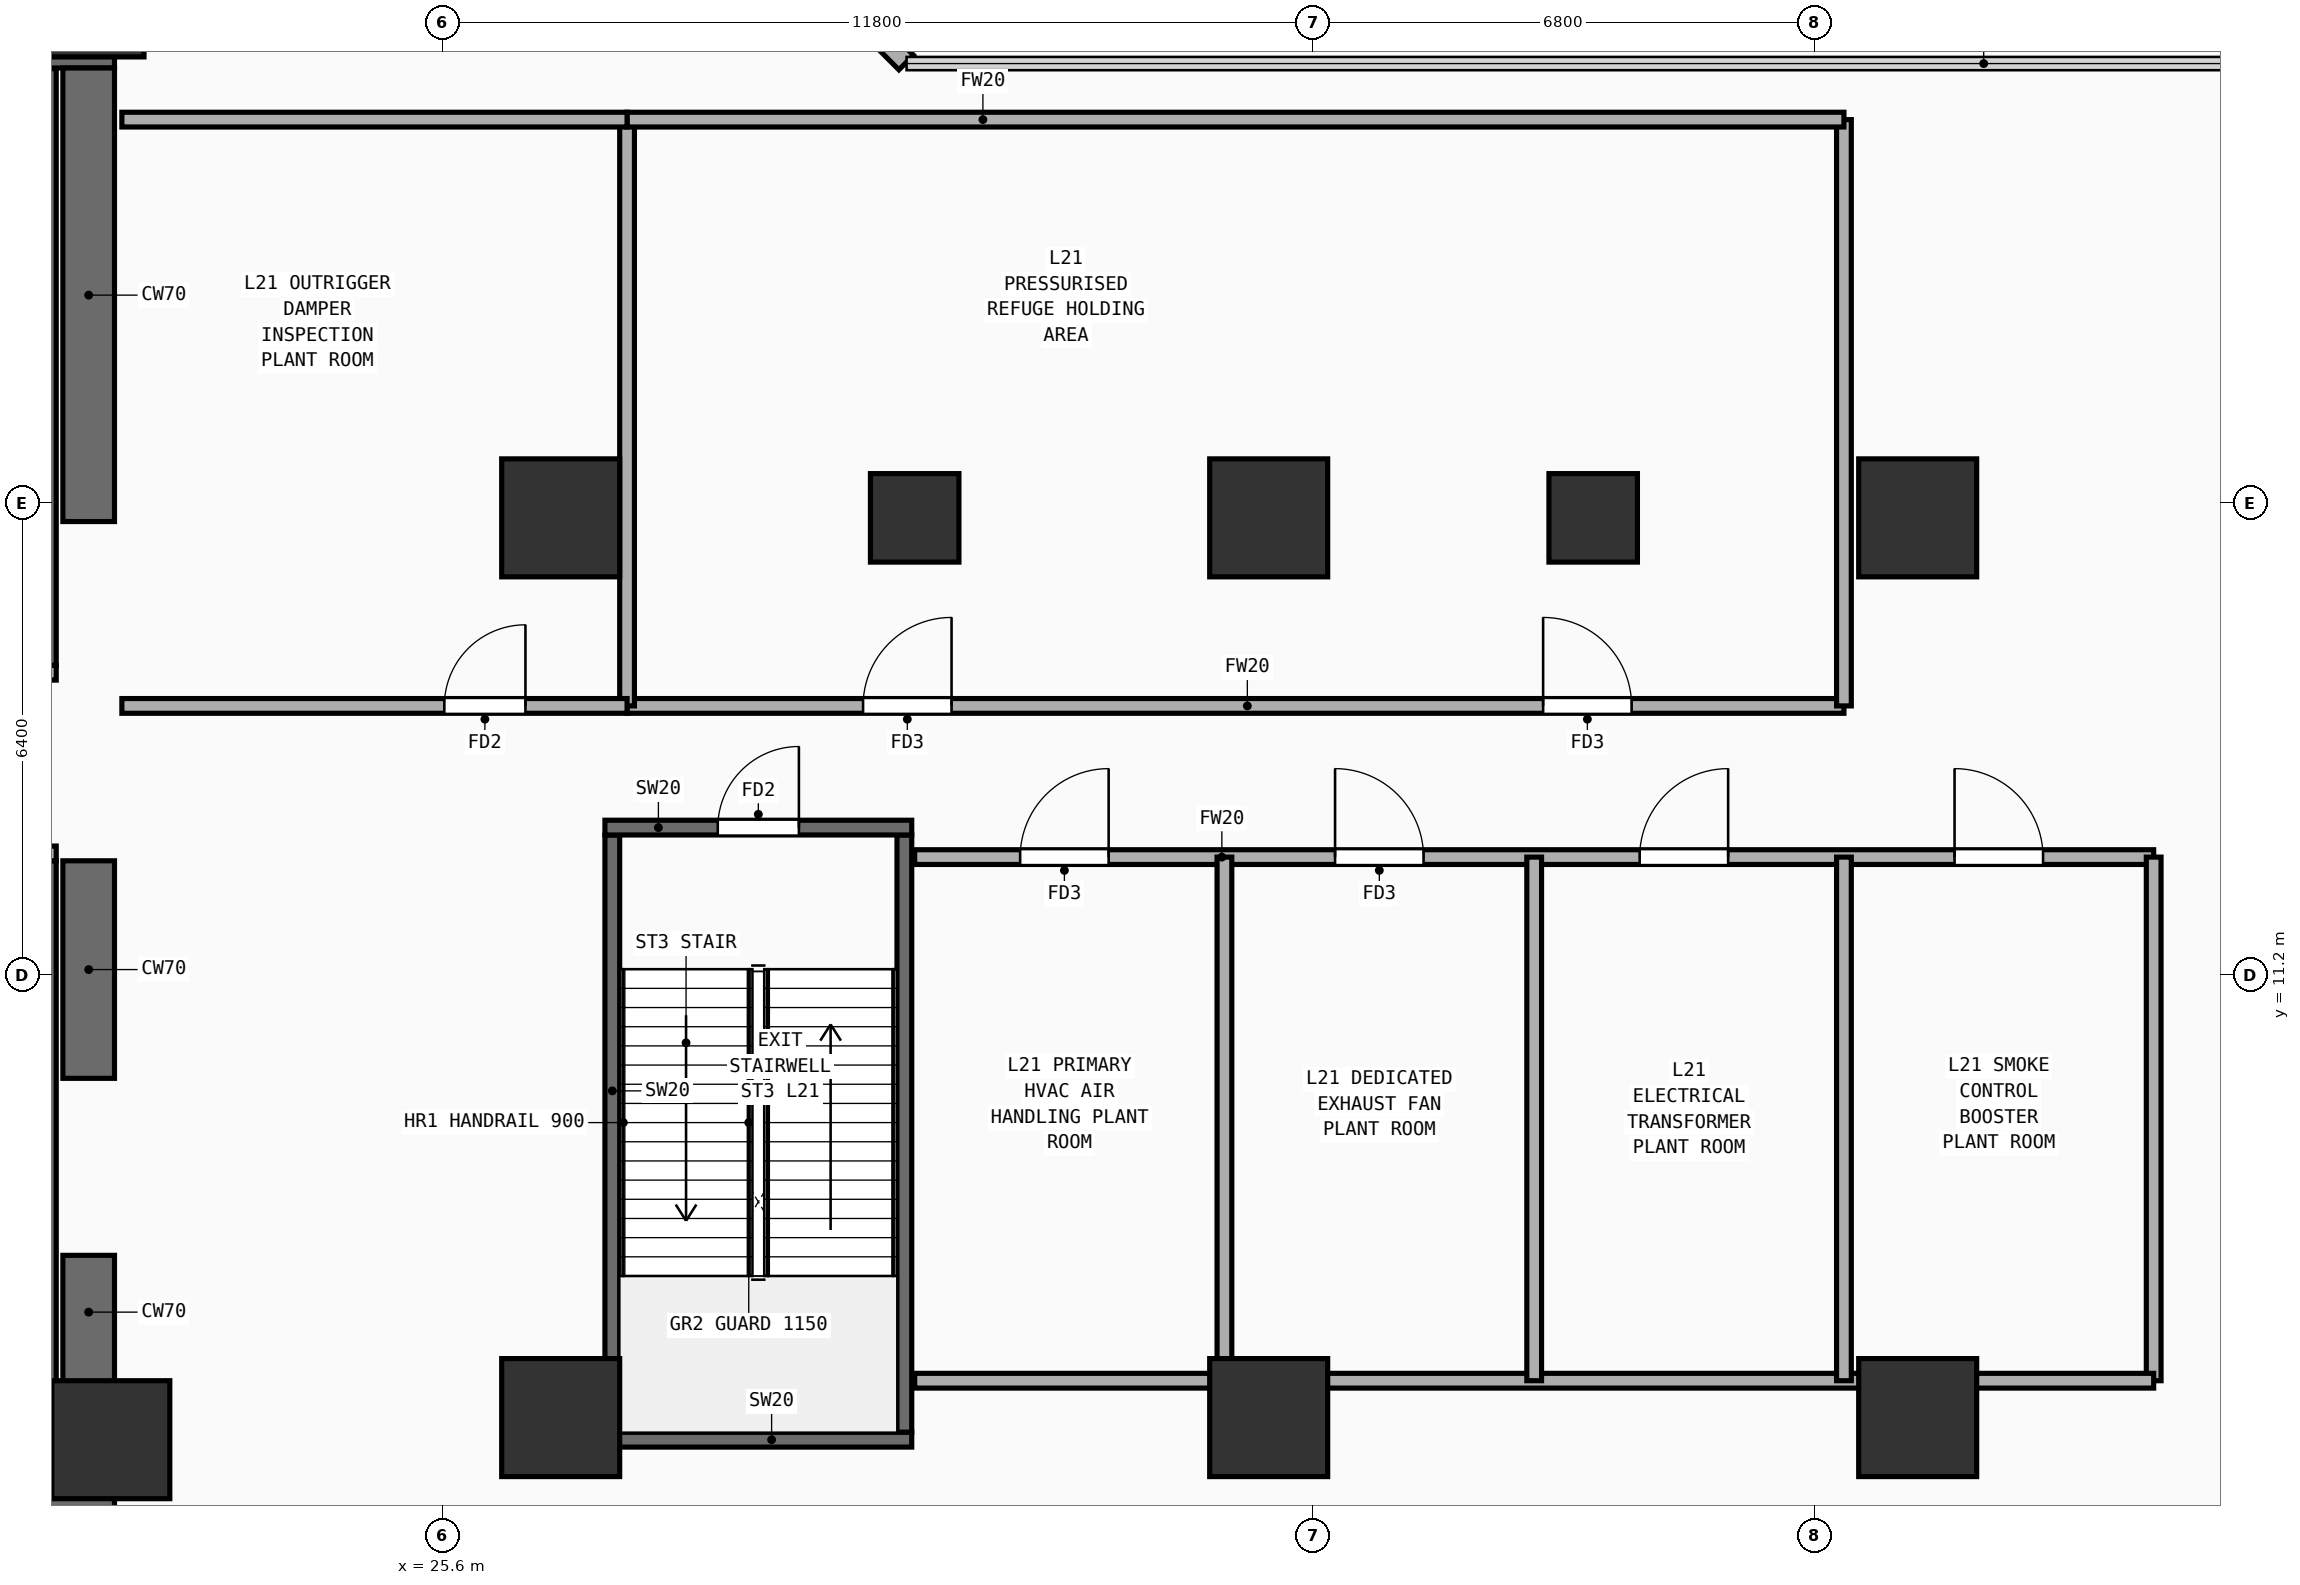
"""IFC4 building model, lengths in metres.
Left out: names, types, materials, properties, quantities, classifications, styles, units other than length and angle.
Written with IfcOpenShell. Run it as: python <this file> out.ifc"""

import sys

from ifc_helpers import new_model, si_unit, direction, frame, frame_2d, origin, origin_2d, place, context, subcontext, project, spatial, rectangle, extrude, element, fill, save


model = new_model("IFC4")
c1 = context("Model", 3, precision=1e-05, world=origin(), true_north=direction((0.0, 1.0)))
c2 = subcontext(c1, "Body", "Model", "MODEL_VIEW")
j1 = project(units=[si_unit("LENGTHUNIT", "METRE"), si_unit("PLANEANGLEUNIT", "RADIAN")], contexts=[c1])
p1 = place(None, origin())
s1 = spatial("IfcSite", under=j1, at=p1, CompositionType="ELEMENT")
p2 = place(p1, origin())
s2 = spatial("IfcBuilding", under=s1, at=p2, CompositionType="ELEMENT")
p3 = place(p2, frame((0.0, 0.0, 82.8)))
s3 = spatial("IfcBuildingStorey", under=s2, at=p3, CompositionType="ELEMENT", Elevation=82.8)
for number, where, z_axis, x_axis in (
    (1, (7.1, 4.3, 0.0), (0.0, 0.0, 1.0), (1.0, 0.0, 0.0)),
    (2, (7.1, 23.85, 0.0), (0.0, 0.0, 1.0), (1.0, 0.0, 0.0)),
):
    element("IfcWall", number, at=place(p3, frame(where, z_axis=z_axis, x_axis=x_axis)), inside=s3, PredefinedType="SHEAR", context=c2, shape_type="SweptSolid", body=[
        extrude(rectangle(XDim=14.05, YDim=0.7, at=frame_2d((7.025, 0.0))), origin(), (0.0, 0.0, 1.0), 4.84),
    ])
p4 = place(p3, frame((20.8, 4.65, 0.0), z_axis=(0.0, 0.0, 1.0), x_axis=(0.0, 1.0, 0.0)))
e3 = element("IfcWall", 3, at=p4, inside=s3, PredefinedType="SHEAR", context=c2, shape_type="SweptSolid", body=[
    extrude(rectangle(XDim=2.75, YDim=0.7, at=frame_2d((1.375, 0.0))), origin(), (0.0, 0.0, 1.0), 4.84),
])
p5 = place(p3, frame((20.8, 9.8, 0.0), z_axis=(0.0, 0.0, 1.0), x_axis=(0.0, 1.0, 0.0)))
e4 = element("IfcWall", 4, at=p5, inside=s3, PredefinedType="SHEAR", context=c2, shape_type="SweptSolid", body=[
    extrude(rectangle(XDim=2.95, YDim=0.7, at=frame_2d((1.475, 0.0))), origin(), (0.0, 0.0, 1.0), 4.84),
])
p6 = place(p3, frame((20.8, 17.35, 0.0), z_axis=(0.0, 0.0, 1.0), x_axis=(0.0, 1.0, 0.0)))
e5 = element("IfcWall", 5, at=p6, inside=s3, PredefinedType="SHEAR", context=c2, shape_type="SweptSolid", body=[
    extrude(rectangle(XDim=6.15, YDim=0.7, at=frame_2d((3.075, 0.0))), origin(), (0.0, 0.0, 1.0), 4.84),
])
for number, where, z_axis, x_axis in (
    (6, (21.1, 4.9, 0.0), (0.0, 0.0, 1.0), (1.0, 0.0, 0.0)),
    (7, (20.75, 24.45, 0.0), (0.0, 0.0, 1.0), (1.0, 0.0, 0.0)),
    (8, (27.2, 5.2, 0.0), (0.0, 0.0, 1.0), (1.0, 0.0, 0.0)),
    (9, (36.8, 5.2, 0.0), (0.0, 0.0, 1.0), (1.0, 0.0, 0.0)),
    (10, (45.6, 5.2, 0.0), (0.0, 0.0, 1.0), (1.0, 0.0, 0.0)),
    (11, (27.2, 17.4, 0.0), (0.0, 0.0, 1.0), (1.0, 0.0, 0.0)),
    (12, (36.8, 17.4, 0.0), (0.0, 0.0, 1.0), (1.0, 0.0, 0.0)),
    (13, (45.6, 17.4, 0.0), (0.0, 0.0, 1.0), (1.0, 0.0, 0.0)),
):
    element("IfcColumn", number, at=place(p3, frame(where, z_axis=z_axis, x_axis=x_axis)), inside=s3, PredefinedType="COLUMN", context=c2, shape_type="SweptSolid", body=[
        extrude(rectangle(XDim=1.6, YDim=1.6, at=origin_2d()), origin(), (0.0, 0.0, 1.0), 4.84),
    ])
for number, where, z_axis, x_axis in (
    (14, (32.0, 17.4, 0.0), (0.0, 0.0, 1.0), (1.0, 0.0, 0.0)),
    (15, (41.2, 17.4, 0.0), (0.0, 0.0, 1.0), (1.0, 0.0, 0.0)),
):
    element("IfcColumn", number, at=place(p3, frame(where, z_axis=z_axis, x_axis=x_axis)), inside=s3, PredefinedType="COLUMN", context=c2, shape_type="SweptSolid", body=[
        extrude(rectangle(XDim=1.2, YDim=1.2, at=origin_2d()), origin(), (0.0, 0.0, 1.0), 4.84),
    ])
p7 = place(p3, frame((31.885, 23.575, 0.0), z_axis=(0.0, 0.0, 1.0), x_axis=(-0.707106781187, 0.707106781187, 0.0)))
e16 = element("IfcWall", 16, at=p7, inside=s3, PredefinedType="SOLIDWALL", context=c2, shape_type="SweptSolid", body=[
    extrude(rectangle(XDim=9.207, YDim=0.28, at=frame_2d((4.603, 0.0))), origin(), (0.0, 0.0, 1.0), 4.84),
])
p8 = place(p3, frame((20.26, 4.66, 0.0), z_axis=(0.0, 0.0, 1.0), x_axis=(0.0, 1.0, 0.0)))
e17 = element("IfcWall", 17, at=p8, inside=s3, PredefinedType="SHEAR", context=c2, shape_type="SweptSolid", body=[
    extrude(rectangle(XDim=8.09, YDim=0.2, at=frame_2d((4.045, 0.0))), origin(), (0.0, 0.0, 1.0), 4.84),
])
p9 = place(p3, frame((16.4, 12.85, 0.0), z_axis=(0.0, 0.0, 1.0), x_axis=(1.0, 0.0, 0.0)))
e18 = element("IfcWall", 18, at=p9, inside=s3, PredefinedType="PARTITIONING", context=c2, shape_type="SweptSolid", body=[
    extrude(rectangle(XDim=3.96, YDim=0.2, at=frame_2d((1.98, 0.0))), origin(), (0.0, 0.0, 1.0), 4.84),
])
p10 = place(p9, frame((1.304, 0.0, 0.0)))
e19 = element("IfcOpeningElement", 19, at=p10, cuts=e18, PredefinedType="OPENING", context=c2, shape_type="SweptSolid", body=[
    extrude(rectangle(XDim=1.1, YDim=2.2, at=frame_2d((0.55, 1.1))), frame((0.0, 0.11, 0.0), z_axis=(0.0, -1.0, 0.0), x_axis=(1.0, 0.0, 0.0)), (0.0, 0.0, 1.0), 0.22),
])
p11 = place(p3, frame((20.26, 15.4, 0.0), z_axis=(0.0, 0.0, 1.0), x_axis=(0.0, 1.0, 0.0)))
e20 = element("IfcWall", 20, at=p11, inside=s3, PredefinedType="SHEAR", context=c2, shape_type="SweptSolid", body=[
    extrude(rectangle(XDim=8.09, YDim=0.2, at=frame_2d((4.045, 0.0))), origin(), (0.0, 0.0, 1.0), 4.84),
])
p12 = place(p3, frame((16.41, 15.3, 0.0), z_axis=(0.0, 0.0, 1.0), x_axis=(1.0, 0.0, 0.0)))
e21 = element("IfcWall", 21, at=p12, inside=s3, PredefinedType="PARTITIONING", context=c2, shape_type="SweptSolid", body=[
    extrude(rectangle(XDim=3.95, YDim=0.2, at=frame_2d((1.975, 0.0))), origin(), (0.0, 0.0, 1.0), 4.84),
])
p13 = place(p12, frame((1.294, 0.0, 0.0)))
e22 = element("IfcOpeningElement", 22, at=p13, cuts=e21, PredefinedType="OPENING", context=c2, shape_type="SweptSolid", body=[
    extrude(rectangle(XDim=1.1, YDim=2.2, at=frame_2d((0.55, 1.1))), frame((0.0, 0.11, 0.0), z_axis=(0.0, -1.0, 0.0), x_axis=(1.0, 0.0, 0.0)), (0.0, 0.0, 1.0), 0.22),
])
for number, where, z_axis, x_axis in (
    (23, (27.9, 5.0, 0.0), (0.0, 0.0, 1.0), (0.0, 1.0, 0.0)),
    (24, (31.86, 5.0, 0.0), (0.0, 0.0, 1.0), (0.0, 1.0, 0.0)),
):
    element("IfcWall", number, at=place(p3, frame(where, z_axis=z_axis, x_axis=x_axis)), inside=s3, PredefinedType="SHEAR", context=c2, shape_type="SweptSolid", body=[
        extrude(rectangle(XDim=8.1, YDim=0.2, at=frame_2d((4.05, 0.0))), origin(), (0.0, 0.0, 1.0), 4.84),
    ])
p14 = place(p3, frame((27.8, 4.9, 0.0), z_axis=(0.0, 0.0, 1.0), x_axis=(1.0, 0.0, 0.0)))
e25 = element("IfcWall", 25, at=p14, inside=s3, PredefinedType="SHEAR", context=c2, shape_type="SweptSolid", body=[
    extrude(rectangle(XDim=4.16, YDim=0.2, at=frame_2d((2.08, 0.0))), origin(), (0.0, 0.0, 1.0), 4.84),
])
p15 = place(p3, frame((27.8, 13.2, 0.0), z_axis=(0.0, 0.0, 1.0), x_axis=(1.0, 0.0, 0.0)))
e26 = element("IfcWall", 26, at=p15, inside=s3, PredefinedType="SHEAR", context=c2, shape_type="SweptSolid", body=[
    extrude(rectangle(XDim=4.16, YDim=0.2, at=frame_2d((2.08, 0.0))), origin(), (0.0, 0.0, 1.0), 4.84),
])
p16 = place(p15, frame((1.53, 0.0, 0.0)))
e27 = element("IfcOpeningElement", 27, at=p16, cuts=e26, PredefinedType="OPENING", context=c2, shape_type="SweptSolid", body=[
    extrude(rectangle(XDim=1.1, YDim=2.2, at=frame_2d((0.55, 1.1))), frame((0.0, 0.11, 0.0), z_axis=(0.0, -1.0, 0.0), x_axis=(1.0, 0.0, 0.0)), (0.0, 0.0, 1.0), 0.22),
])
p17 = place(p3, frame((28.1, 14.85, 0.0), z_axis=(0.0, 0.0, 1.0), x_axis=(1.0, 0.0, 0.0)))
e28 = element("IfcWall", 28, at=p17, inside=s3, PredefinedType="PARTITIONING", context=c2, shape_type="SweptSolid", body=[
    extrude(rectangle(XDim=16.5, YDim=0.2, at=frame_2d((8.25, 0.0))), origin(), (0.0, 0.0, 1.0), 4.84),
])
p18 = place(p17, frame((3.2, 0.0, 0.0)))
e29 = element("IfcOpeningElement", 29, at=p18, cuts=e28, PredefinedType="OPENING", context=c2, shape_type="SweptSolid", body=[
    extrude(rectangle(XDim=1.2, YDim=2.25, at=frame_2d((0.6, 1.125))), frame((0.0, 0.11, 0.0), z_axis=(0.0, -1.0, 0.0), x_axis=(1.0, 0.0, 0.0)), (0.0, 0.0, 1.0), 0.22),
])
p19 = place(p17, frame((12.421, 0.0, 0.0)))
e30 = element("IfcOpeningElement", 30, at=p19, cuts=e28, PredefinedType="OPENING", context=c2, shape_type="SweptSolid", body=[
    extrude(rectangle(XDim=1.2, YDim=2.25, at=frame_2d((0.6, 1.125))), frame((0.0, 0.11, 0.0), z_axis=(0.0, -1.0, 0.0), x_axis=(1.0, 0.0, 0.0)), (0.0, 0.0, 1.0), 0.22),
])
for number, where, z_axis, x_axis in (
    (31, (28.1, 14.85, 0.0), (0.0, 0.0, 1.0), (0.0, 1.0, 0.0)),
    (32, (44.6, 14.85, 0.0), (0.0, 0.0, 1.0), (0.0, 1.0, 0.0)),
):
    element("IfcWall", number, at=place(p3, frame(where, z_axis=z_axis, x_axis=x_axis)), inside=s3, PredefinedType="PARTITIONING", context=c2, shape_type="SweptSolid", body=[
        extrude(rectangle(XDim=7.95, YDim=0.2, at=frame_2d((3.975, 0.0))), origin(), (0.0, 0.0, 1.0), 4.84),
    ])
p20 = place(p3, frame((28.1, 22.8, 0.0), z_axis=(0.0, 0.0, 1.0), x_axis=(1.0, 0.0, 0.0)))
e33 = element("IfcWall", 33, at=p20, inside=s3, PredefinedType="PARTITIONING", context=c2, shape_type="SweptSolid", body=[
    extrude(rectangle(XDim=16.5, YDim=0.2, at=frame_2d((8.25, 0.0))), origin(), (0.0, 0.0, 1.0), 4.84),
])
p21 = place(p3, frame((21.25, 14.85, 0.0), z_axis=(0.0, 0.0, 1.0), x_axis=(1.0, 0.0, 0.0)))
e34 = element("IfcWall", 34, at=p21, inside=s3, PredefinedType="PARTITIONING", context=c2, shape_type="SweptSolid", body=[
    extrude(rectangle(XDim=6.85, YDim=0.2, at=frame_2d((3.425, 0.0))), origin(), (0.0, 0.0, 1.0), 4.84),
])
p22 = place(p21, frame((4.372, 0.0, 0.0)))
e35 = element("IfcOpeningElement", 35, at=p22, cuts=e34, PredefinedType="OPENING", context=c2, shape_type="SweptSolid", body=[
    extrude(rectangle(XDim=1.1, YDim=2.2, at=frame_2d((0.55, 1.1))), frame((0.0, 0.11, 0.0), z_axis=(0.0, -1.0, 0.0), x_axis=(1.0, 0.0, 0.0)), (0.0, 0.0, 1.0), 0.22),
])
p23 = place(p3, frame((21.25, 22.8, 0.0), z_axis=(0.0, 0.0, 1.0), x_axis=(1.0, 0.0, 0.0)))
e36 = element("IfcWall", 36, at=p23, inside=s3, PredefinedType="PARTITIONING", context=c2, shape_type="SweptSolid", body=[
    extrude(rectangle(XDim=6.85, YDim=0.2, at=frame_2d((3.425, 0.0))), origin(), (0.0, 0.0, 1.0), 4.84),
])
p24 = place(p3, frame((32.0, 12.8, 0.0), z_axis=(0.0, 0.0, 1.0), x_axis=(1.0, 0.0, 0.0)))
e37 = element("IfcWall", 37, at=p24, inside=s3, PredefinedType="PARTITIONING", context=c2, shape_type="SweptSolid", body=[
    extrude(rectangle(XDim=16.8, YDim=0.2, at=frame_2d((8.4, 0.0))), origin(), (0.0, 0.0, 1.0), 4.84),
])
p25 = place(p24, frame((1.43, 0.0, 0.0)))
e38 = element("IfcOpeningElement", 38, at=p25, cuts=e37, PredefinedType="OPENING", context=c2, shape_type="SweptSolid", body=[
    extrude(rectangle(XDim=1.2, YDim=2.25, at=frame_2d((0.6, 1.125))), frame((0.0, 0.11, 0.0), z_axis=(0.0, -1.0, 0.0), x_axis=(1.0, 0.0, 0.0)), (0.0, 0.0, 1.0), 0.22),
])
p26 = place(p24, frame((5.7, 0.0, 0.0)))
e39 = element("IfcOpeningElement", 39, at=p26, cuts=e37, PredefinedType="OPENING", context=c2, shape_type="SweptSolid", body=[
    extrude(rectangle(XDim=1.2, YDim=2.25, at=frame_2d((0.6, 1.125))), frame((0.0, 0.11, 0.0), z_axis=(0.0, -1.0, 0.0), x_axis=(1.0, 0.0, 0.0)), (0.0, 0.0, 1.0), 0.22),
])
p27 = place(p24, frame((9.83, 0.0, 0.0)))
e40 = element("IfcOpeningElement", 40, at=p27, cuts=e37, PredefinedType="OPENING", context=c2, shape_type="SweptSolid", body=[
    extrude(rectangle(XDim=1.2, YDim=2.25, at=frame_2d((0.6, 1.125))), frame((0.0, 0.11, 0.0), z_axis=(0.0, -1.0, 0.0), x_axis=(1.0, 0.0, 0.0)), (0.0, 0.0, 1.0), 0.22),
])
p28 = place(p24, frame((14.1, 0.0, 0.0)))
e41 = element("IfcOpeningElement", 41, at=p28, cuts=e37, PredefinedType="OPENING", context=c2, shape_type="SweptSolid", body=[
    extrude(rectangle(XDim=1.2, YDim=2.25, at=frame_2d((0.6, 1.125))), frame((0.0, 0.11, 0.0), z_axis=(0.0, -1.0, 0.0), x_axis=(1.0, 0.0, 0.0)), (0.0, 0.0, 1.0), 0.22),
])
p29 = place(p3, frame((48.8, 5.7, 0.0), z_axis=(0.0, 0.0, 1.0), x_axis=(0.0, 1.0, 0.0)))
e42 = element("IfcWall", 42, at=p29, inside=s3, PredefinedType="PARTITIONING", context=c2, shape_type="SweptSolid", body=[
    extrude(rectangle(XDim=7.1, YDim=0.2, at=frame_2d((3.55, 0.0))), origin(), (0.0, 0.0, 1.0), 4.84),
])
p30 = place(p3, frame((32.0, 5.7, 0.0), z_axis=(0.0, 0.0, 1.0), x_axis=(1.0, 0.0, 0.0)))
e43 = element("IfcWall", 43, at=p30, inside=s3, PredefinedType="PARTITIONING", context=c2, shape_type="SweptSolid", body=[
    extrude(rectangle(XDim=16.8, YDim=0.2, at=frame_2d((8.4, 0.0))), origin(), (0.0, 0.0, 1.0), 4.84),
])
for number, where, z_axis, x_axis in (
    (44, (36.2, 5.7, 0.0), (0.0, 0.0, 1.0), (0.0, 1.0, 0.0)),
    (45, (40.4, 5.7, 0.0), (0.0, 0.0, 1.0), (0.0, 1.0, 0.0)),
    (46, (44.6, 5.7, 0.0), (0.0, 0.0, 1.0), (0.0, 1.0, 0.0)),
):
    element("IfcWall", number, at=place(p3, frame(where, z_axis=z_axis, x_axis=x_axis)), inside=s3, PredefinedType="PARTITIONING", context=c2, shape_type="SweptSolid", body=[
        extrude(rectangle(XDim=7.1, YDim=0.2, at=frame_2d((3.55, 0.0))), origin(), (0.0, 0.0, 1.0), 4.84),
    ])
p31 = place(p16, frame((1.1, 0.0, 0.0), z_axis=(0.0, 0.0, 1.0), x_axis=(-1.0, 0.0, 0.0)))
e47 = element("IfcDoor", 47, at=p31, inside=s3, OperationType="SINGLE_SWING_LEFT", PredefinedType="DOOR", context=c2, shape_type="SweptSolid", body=[
    extrude(rectangle(XDim=1.1, YDim=2.2, at=frame_2d((0.55, 1.1))), frame((0.0, 0.025, 0.0), z_axis=(0.0, -1.0, 0.0), x_axis=(1.0, 0.0, 0.0)), (0.0, 0.0, 1.0), 0.05),
])
fill(e27, e47)
p32 = place(p18, origin())
e48 = element("IfcDoor", 48, at=p32, inside=s3, OperationType="SINGLE_SWING_RIGHT", PredefinedType="DOOR", context=c2, shape_type="SweptSolid", body=[
    extrude(rectangle(XDim=1.2, YDim=2.25, at=frame_2d((0.6, 1.125))), frame((0.0, 0.025, 0.0), z_axis=(0.0, -1.0, 0.0), x_axis=(1.0, 0.0, 0.0)), (0.0, 0.0, 1.0), 0.05),
])
fill(e29, e48)
p33 = place(p19, origin())
e49 = element("IfcDoor", 49, at=p33, inside=s3, OperationType="SINGLE_SWING_LEFT", PredefinedType="DOOR", context=c2, shape_type="SweptSolid", body=[
    extrude(rectangle(XDim=1.2, YDim=2.25, at=frame_2d((0.6, 1.125))), frame((0.0, 0.025, 0.0), z_axis=(0.0, -1.0, 0.0), x_axis=(1.0, 0.0, 0.0)), (0.0, 0.0, 1.0), 0.05),
])
fill(e30, e49)
p34 = place(p22, origin())
e50 = element("IfcDoor", 50, at=p34, inside=s3, OperationType="SINGLE_SWING_RIGHT", PredefinedType="DOOR", context=c2, shape_type="SweptSolid", body=[
    extrude(rectangle(XDim=1.1, YDim=2.2, at=frame_2d((0.55, 1.1))), frame((0.0, 0.025, 0.0), z_axis=(0.0, -1.0, 0.0), x_axis=(1.0, 0.0, 0.0)), (0.0, 0.0, 1.0), 0.05),
])
fill(e35, e50)
p35 = place(p25, origin())
e51 = element("IfcDoor", 51, at=p35, inside=s3, OperationType="SINGLE_SWING_RIGHT", PredefinedType="DOOR", context=c2, shape_type="SweptSolid", body=[
    extrude(rectangle(XDim=1.2, YDim=2.25, at=frame_2d((0.6, 1.125))), frame((0.0, 0.025, 0.0), z_axis=(0.0, -1.0, 0.0), x_axis=(1.0, 0.0, 0.0)), (0.0, 0.0, 1.0), 0.05),
])
fill(e38, e51)
p36 = place(p26, origin())
e52 = element("IfcDoor", 52, at=p36, inside=s3, OperationType="SINGLE_SWING_LEFT", PredefinedType="DOOR", context=c2, shape_type="SweptSolid", body=[
    extrude(rectangle(XDim=1.2, YDim=2.25, at=frame_2d((0.6, 1.125))), frame((0.0, 0.025, 0.0), z_axis=(0.0, -1.0, 0.0), x_axis=(1.0, 0.0, 0.0)), (0.0, 0.0, 1.0), 0.05),
])
fill(e39, e52)
p37 = place(p27, origin())
e53 = element("IfcDoor", 53, at=p37, inside=s3, OperationType="SINGLE_SWING_RIGHT", PredefinedType="DOOR", context=c2, shape_type="SweptSolid", body=[
    extrude(rectangle(XDim=1.2, YDim=2.25, at=frame_2d((0.6, 1.125))), frame((0.0, 0.025, 0.0), z_axis=(0.0, -1.0, 0.0), x_axis=(1.0, 0.0, 0.0)), (0.0, 0.0, 1.0), 0.05),
])
fill(e40, e53)
p38 = place(p28, origin())
e54 = element("IfcDoor", 54, at=p38, inside=s3, OperationType="SINGLE_SWING_LEFT", PredefinedType="DOOR", context=c2, shape_type="SweptSolid", body=[
    extrude(rectangle(XDim=1.2, YDim=2.25, at=frame_2d((0.6, 1.125))), frame((0.0, 0.025, 0.0), z_axis=(0.0, -1.0, 0.0), x_axis=(1.0, 0.0, 0.0)), (0.0, 0.0, 1.0), 0.05),
])
fill(e41, e54)
save(model, sys.argv[1])
